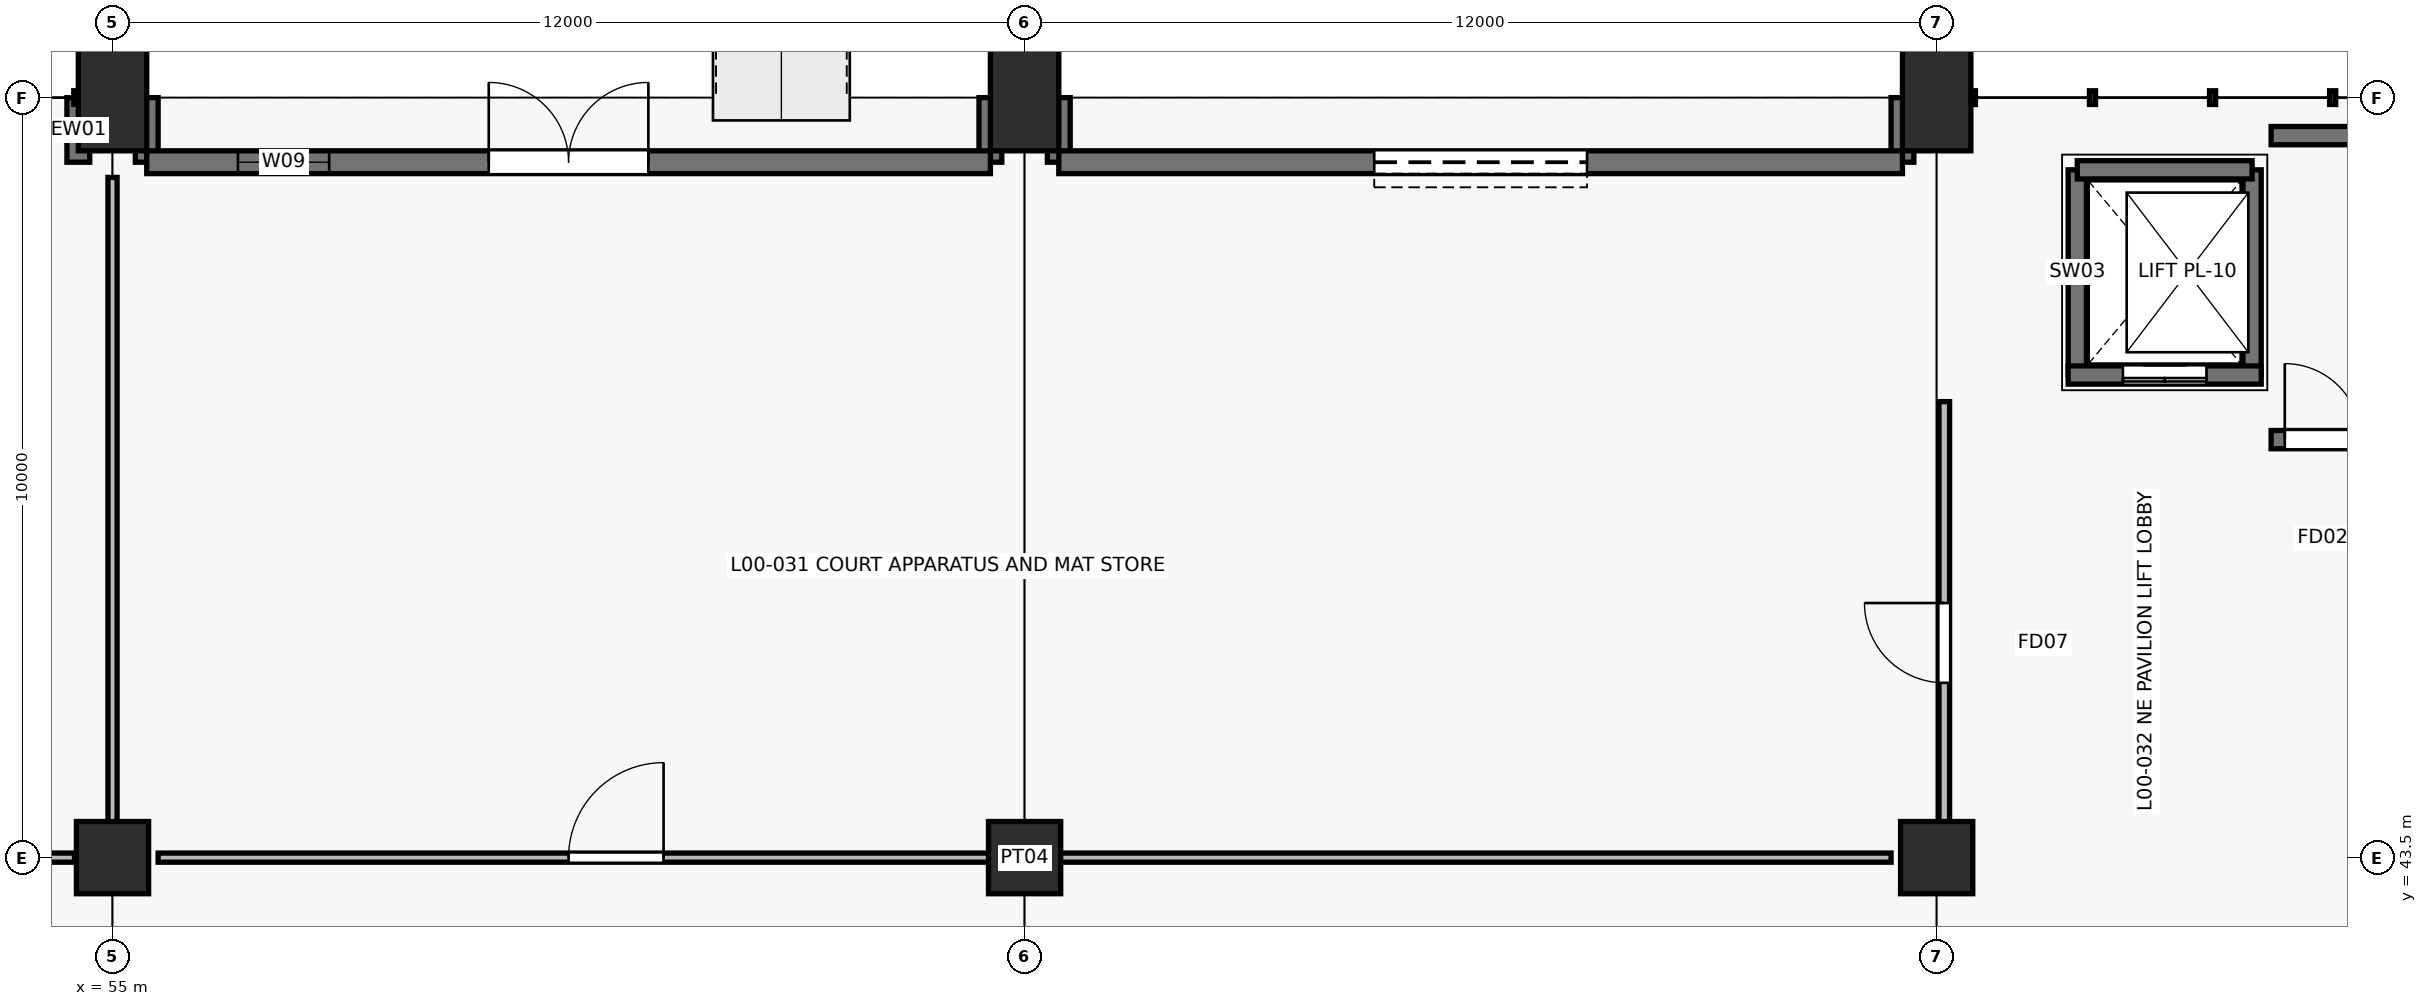
"""IFC4 building model, lengths in metres.
Left out: names, types, materials, properties, quantities, classifications, styles, units other than length and angle.
Written with IfcOpenShell. Run it as: python <this file> out.ifc"""

import sys

from ifc_helpers import new_model, si_unit, direction, frame, frame_2d, origin, origin_2d, place, context, subcontext, project, spatial, rectangle, extrude, element, fill, save


model = new_model("IFC4")
c1 = context("Model", 3, precision=1e-05, world=origin(), true_north=direction((0.0, 1.0)))
c2 = subcontext(c1, "Body", "Model", "MODEL_VIEW")
j1 = project(units=[si_unit("LENGTHUNIT", "METRE"), si_unit("PLANEANGLEUNIT", "RADIAN")], contexts=[c1])
p1 = place(None, origin())
s1 = spatial("IfcSite", under=j1, at=p1, CompositionType="ELEMENT")
p2 = place(p1, origin())
s2 = spatial("IfcBuilding", under=s1, at=p2, CompositionType="ELEMENT")
p3 = place(p2, origin())
s3 = spatial("IfcBuildingStorey", under=s2, at=p3, CompositionType="ELEMENT", Elevation=0.0)
p4 = place(p3, frame((55.0, 43.5, 0.0), z_axis=(0.0, 0.0, 1.0), x_axis=(1.0, 0.0, 0.0)))
e1 = element("IfcColumn", 1, at=p4, inside=s3, PredefinedType="COLUMN", context=c2, shape_type="SweptSolid", body=[
    extrude(rectangle(XDim=0.95, YDim=0.95, at=origin_2d()), origin(), (0.0, 0.0, 1.0), 4.8),
])
p5 = place(p3, frame((55.0, 53.5, 0.0), z_axis=(0.0, 0.0, 1.0), x_axis=(1.0, 0.0, 0.0)))
e2 = element("IfcColumn", 2, at=p5, inside=s3, PredefinedType="PILASTER", context=c2, shape_type="SweptSolid", body=[
    extrude(rectangle(XDim=0.9, YDim=1.4, at=origin_2d()), origin(), (0.0, 0.0, 1.0), 4.8),
])
p6 = place(p3, frame((67.0, 43.5, 0.0), z_axis=(0.0, 0.0, 1.0), x_axis=(1.0, 0.0, 0.0)))
e3 = element("IfcColumn", 3, at=p6, inside=s3, PredefinedType="COLUMN", context=c2, shape_type="SweptSolid", body=[
    extrude(rectangle(XDim=0.95, YDim=0.95, at=origin_2d()), origin(), (0.0, 0.0, 1.0), 4.8),
])
p7 = place(p3, frame((67.0, 53.5, 0.0), z_axis=(0.0, 0.0, 1.0), x_axis=(1.0, 0.0, 0.0)))
e4 = element("IfcColumn", 4, at=p7, inside=s3, PredefinedType="PILASTER", context=c2, shape_type="SweptSolid", body=[
    extrude(rectangle(XDim=0.9, YDim=1.4, at=origin_2d()), origin(), (0.0, 0.0, 1.0), 4.8),
])
p8 = place(p3, frame((79.0, 43.5, 0.0), z_axis=(0.0, 0.0, 1.0), x_axis=(1.0, 0.0, 0.0)))
e5 = element("IfcColumn", 5, at=p8, inside=s3, PredefinedType="COLUMN", context=c2, shape_type="SweptSolid", body=[
    extrude(rectangle(XDim=0.95, YDim=0.95, at=origin_2d()), origin(), (0.0, 0.0, 1.0), 4.8),
])
p9 = place(p3, frame((79.0, 53.5, 0.0), z_axis=(0.0, 0.0, 1.0), x_axis=(1.0, 0.0, 0.0)))
e6 = element("IfcColumn", 6, at=p9, inside=s3, PredefinedType="PILASTER", context=c2, shape_type="SweptSolid", body=[
    extrude(rectangle(XDim=0.9, YDim=1.4, at=origin_2d()), origin(), (0.0, 0.0, 1.0), 4.8),
])
for number, where, z_axis, x_axis in (
    (7, (54.55, 53.5, 0.0), (0.0, 0.0, 1.0), (0.0, -1.0, 0.0)),
    (8, (55.45, 52.65, 0.0), (0.0, 0.0, 1.0), (0.0, 1.0, 0.0)),
    (9, (66.55, 53.5, 0.0), (0.0, 0.0, 1.0), (0.0, -1.0, 0.0)),
):
    element("IfcWall", number, at=place(p3, frame(where, z_axis=z_axis, x_axis=x_axis)), inside=s3, PredefinedType="SOLIDWALL", context=c2, shape_type="SweptSolid", body=[
        extrude(rectangle(XDim=0.85, YDim=0.3, at=frame_2d((0.425, 0.0))), origin(), (0.0, 0.0, 1.0), 4.8),
    ])
p10 = place(p3, frame((55.45, 52.65, 0.0), z_axis=(0.0, 0.0, 1.0), x_axis=(1.0, 0.0, 0.0)))
e10 = element("IfcWall", 10, at=p10, inside=s3, PredefinedType="SOLIDWALL", context=c2, shape_type="SweptSolid", body=[
    extrude(rectangle(XDim=11.1, YDim=0.3, at=frame_2d((5.55, 0.0))), origin(), (0.0, 0.0, 1.0), 4.8),
])
p11 = place(p10, frame((4.5, 0.0, 0.0)))
e11 = element("IfcOpeningElement", 11, at=p11, cuts=e10, PredefinedType="OPENING", context=c2, shape_type="SweptSolid", body=[
    extrude(rectangle(XDim=2.1, YDim=2.35, at=frame_2d((1.05, 1.175))), frame((0.0, 0.16, 0.0), z_axis=(0.0, -1.0, 0.0), x_axis=(1.0, 0.0, 0.0)), (0.0, 0.0, 1.0), 0.32),
])
p12 = place(p10, frame((1.2, 0.0, 1.0)))
e12 = element("IfcOpeningElement", 12, at=p12, cuts=e10, PredefinedType="OPENING", context=c2, shape_type="SweptSolid", body=[
    extrude(rectangle(XDim=1.2, YDim=1.8, at=frame_2d((0.6, 0.9))), frame((0.0, 0.16, 0.0), z_axis=(0.0, -1.0, 0.0), x_axis=(1.0, 0.0, 0.0)), (0.0, 0.0, 1.0), 0.32),
])
for number, where, z_axis, x_axis in (
    (13, (67.45, 52.65, 0.0), (0.0, 0.0, 1.0), (0.0, 1.0, 0.0)),
    (14, (78.55, 53.5, 0.0), (0.0, 0.0, 1.0), (0.0, -1.0, 0.0)),
):
    element("IfcWall", number, at=place(p3, frame(where, z_axis=z_axis, x_axis=x_axis)), inside=s3, PredefinedType="SOLIDWALL", context=c2, shape_type="SweptSolid", body=[
        extrude(rectangle(XDim=0.85, YDim=0.3, at=frame_2d((0.425, 0.0))), origin(), (0.0, 0.0, 1.0), 4.8),
    ])
p13 = place(p3, frame((67.45, 52.65, 0.0), z_axis=(0.0, 0.0, 1.0), x_axis=(1.0, 0.0, 0.0)))
e15 = element("IfcWall", 15, at=p13, inside=s3, PredefinedType="SOLIDWALL", context=c2, shape_type="SweptSolid", body=[
    extrude(rectangle(XDim=11.1, YDim=0.3, at=frame_2d((5.55, 0.0))), origin(), (0.0, 0.0, 1.0), 4.8),
])
p14 = place(p13, frame((4.15, 0.0, 0.0)))
e16 = element("IfcOpeningElement", 16, at=p14, cuts=e15, PredefinedType="OPENING", context=c2, shape_type="SweptSolid", body=[
    extrude(rectangle(XDim=2.8, YDim=2.7, at=frame_2d((1.4, 1.35))), frame((0.0, 0.16, 0.0), z_axis=(0.0, -1.0, 0.0), x_axis=(1.0, 0.0, 0.0)), (0.0, 0.0, 1.0), 0.32),
])
p15 = place(p3, frame((80.85, 49.85, -1.3), z_axis=(0.0, 0.0, 1.0), x_axis=(0.0, 1.0, 0.0)))
e17 = element("IfcWall", 17, at=p15, inside=s3, PredefinedType="SHEAR", context=c2, shape_type="SweptSolid", body=[
    extrude(rectangle(XDim=2.7, YDim=0.24, at=frame_2d((1.35, 0.0))), origin(), (0.0, 0.0, 1.0), 6.1),
])
p16 = place(p3, frame((83.15, 52.55, 0.0), z_axis=(0.0, 0.0, 1.0), x_axis=(0.0, -1.0, 0.0)))
e18 = element("IfcWall", 18, at=p16, inside=s3, PredefinedType="SHEAR", context=c2, shape_type="SweptSolid", body=[
    extrude(rectangle(XDim=2.7, YDim=0.24, at=frame_2d((1.35, 0.0))), origin(), (0.0, 0.0, 1.0), 4.8),
])
p17 = place(p3, frame((80.85, 52.55, 0.0), z_axis=(0.0, 0.0, 1.0), x_axis=(1.0, 0.0, 0.0)))
e19 = element("IfcWall", 19, at=p17, inside=s3, PredefinedType="SHEAR", context=c2, shape_type="SweptSolid", body=[
    extrude(rectangle(XDim=2.3, YDim=0.24, at=frame_2d((1.15, 0.0))), origin(), (0.0, 0.0, 1.0), 4.8),
])
p18 = place(p3, frame((83.27, 49.85, 0.0), z_axis=(0.0, 0.0, 1.0), x_axis=(-1.0, 0.0, 0.0)))
e20 = element("IfcWall", 20, at=p18, inside=s3, PredefinedType="SHEAR", context=c2, shape_type="SweptSolid", body=[
    extrude(rectangle(XDim=2.54, YDim=0.24, at=frame_2d((1.27, 0.0))), origin(), (0.0, 0.0, 1.0), 4.8),
])
p19 = place(p18, frame((0.72, 0.0, 0.0)))
e21 = element("IfcOpeningElement", 21, at=p19, cuts=e20, PredefinedType="OPENING", context=c2, shape_type="SweptSolid", body=[
    extrude(rectangle(XDim=1.1, YDim=2.15, at=frame_2d((0.55, 1.075))), frame((0.0, 0.13, 0.0), z_axis=(0.0, -1.0, 0.0), x_axis=(1.0, 0.0, 0.0)), (0.0, 0.0, 1.0), 0.26),
])
p20 = place(p3, frame((83.4, 53.0, 0.0), z_axis=(0.0, 0.0, 1.0), x_axis=(1.0, 0.0, 0.0)))
e22 = element("IfcWall", 22, at=p20, inside=s3, PredefinedType="SHEAR", context=c2, shape_type="SweptSolid", body=[
    extrude(rectangle(XDim=7.15, YDim=0.24, at=frame_2d((3.575, 0.0))), origin(), (0.0, 0.0, 1.0), 4.8),
])
p21 = place(p3, frame((83.4, 49.0, 0.0), z_axis=(0.0, 0.0, 1.0), x_axis=(1.0, 0.0, 0.0)))
e23 = element("IfcWall", 23, at=p21, inside=s3, PredefinedType="SHEAR", context=c2, shape_type="SweptSolid", body=[
    extrude(rectangle(XDim=7.15, YDim=0.24, at=frame_2d((3.575, 0.0))), origin(), (0.0, 0.0, 1.0), 4.8),
])
p22 = place(p21, frame((0.18, 0.0, 0.0)))
e24 = element("IfcOpeningElement", 24, at=p22, cuts=e23, PredefinedType="OPENING", context=c2, shape_type="SweptSolid", body=[
    extrude(rectangle(XDim=1.0, YDim=2.15, at=frame_2d((0.5, 1.075))), frame((0.0, 0.13, 0.0), z_axis=(0.0, -1.0, 0.0), x_axis=(1.0, 0.0, 0.0)), (0.0, 0.0, 1.0), 0.26),
])
p23 = place(p3, frame((79.1, 43.6, 0.0), z_axis=(0.0, 0.0, 1.0), x_axis=(0.0, 1.0, 0.0)))
e25 = element("IfcWall", 25, at=p23, inside=s3, PredefinedType="PARTITIONING", context=c2, shape_type="SweptSolid", body=[
    extrude(rectangle(XDim=5.9, YDim=0.14, at=frame_2d((2.95, 0.0))), origin(), (0.0, 0.0, 1.0), 3.645),
])
p24 = place(p23, frame((2.2, 0.0, 0.0)))
e26 = element("IfcOpeningElement", 26, at=p24, cuts=e25, PredefinedType="OPENING", context=c2, shape_type="SweptSolid", body=[
    extrude(rectangle(XDim=1.05, YDim=2.1, at=frame_2d((0.525, 1.05))), frame((0.0, 0.08, 0.0), z_axis=(0.0, -1.0, 0.0), x_axis=(1.0, 0.0, 0.0)), (0.0, 0.0, 1.0), 0.16),
])
p25 = place(p3, frame((19.5, 43.5, 0.0), z_axis=(0.0, 0.0, 1.0), x_axis=(1.0, 0.0, 0.0)))
e27 = element("IfcWall", 27, at=p25, inside=s3, PredefinedType="PARTITIONING", context=c2, shape_type="SweptSolid", body=[
    extrude(rectangle(XDim=35.0, YDim=0.12, at=frame_2d((17.5, 0.0))), origin(), (0.0, 0.0, 1.0), 3.645),
])
p26 = place(p25, frame((5.4, 0.0, 0.0)))
e28 = element("IfcOpeningElement", 28, at=p26, cuts=e27, PredefinedType="OPENING", context=c2, shape_type="SweptSolid", body=[
    extrude(rectangle(XDim=1.25, YDim=2.2, at=frame_2d((0.625, 1.1))), frame((0.0, 0.07, 0.0), z_axis=(0.0, -1.0, 0.0), x_axis=(1.0, 0.0, 0.0)), (0.0, 0.0, 1.0), 0.14),
])
p27 = place(p3, frame((55.6, 43.5, 0.0), z_axis=(0.0, 0.0, 1.0), x_axis=(1.0, 0.0, 0.0)))
e29 = element("IfcWall", 29, at=p27, inside=s3, PredefinedType="PARTITIONING", context=c2, shape_type="SweptSolid", body=[
    extrude(rectangle(XDim=22.8, YDim=0.12, at=frame_2d((11.4, 0.0))), origin(), (0.0, 0.0, 1.0), 3.645),
])
p28 = place(p27, frame((5.4, 0.0, 0.0)))
e30 = element("IfcOpeningElement", 30, at=p28, cuts=e29, PredefinedType="OPENING", context=c2, shape_type="SweptSolid", body=[
    extrude(rectangle(XDim=1.25, YDim=2.2, at=frame_2d((0.625, 1.1))), frame((0.0, 0.07, 0.0), z_axis=(0.0, -1.0, 0.0), x_axis=(1.0, 0.0, 0.0)), (0.0, 0.0, 1.0), 0.14),
])
p29 = place(p3, frame((55.0, 43.5, 0.0), z_axis=(0.0, 0.0, 1.0), x_axis=(0.0, 1.0, 0.0)))
e31 = element("IfcWall", 31, at=p29, inside=s3, PredefinedType="PARTITIONING", context=c2, shape_type="SweptSolid", body=[
    extrude(rectangle(XDim=8.95, YDim=0.12, at=frame_2d((4.475, 0.0))), origin(), (0.0, 0.0, 1.0), 3.645),
])
p30 = place(p11, origin())
e32 = element("IfcDoor", 32, at=p30, inside=s3, OperationType="DOUBLE_DOOR_SINGLE_SWING", PredefinedType="DOOR", context=c2, shape_type="SweptSolid", body=[
    extrude(rectangle(XDim=2.1, YDim=2.35, at=frame_2d((1.05, 1.175))), frame((0.0, 0.025, 0.0), z_axis=(0.0, -1.0, 0.0), x_axis=(1.0, 0.0, 0.0)), (0.0, 0.0, 1.0), 0.05),
])
fill(e11, e32)
p31 = place(p12, origin())
e33 = element("IfcWindow", 33, at=p31, inside=s3, PartitioningType="SINGLE_PANEL", PredefinedType="WINDOW", context=c2, shape_type="SweptSolid", body=[
    extrude(rectangle(XDim=1.2, YDim=1.8, at=frame_2d((0.6, 0.9))), frame((0.0, 0.03, 0.0), z_axis=(0.0, -1.0, 0.0), x_axis=(1.0, 0.0, 0.0)), (0.0, 0.0, 1.0), 0.06),
])
fill(e12, e33)
p32 = place(p14, origin())
e34 = element("IfcDoor", 34, at=p32, inside=s3, OperationType="DOUBLE_DOOR_SINGLE_SWING", PredefinedType="GATE", context=c2, shape_type="SweptSolid", body=[
    extrude(rectangle(XDim=2.8, YDim=2.7, at=frame_2d((1.4, 1.35))), frame((0.0, 0.025, 0.0), z_axis=(0.0, -1.0, 0.0), x_axis=(1.0, 0.0, 0.0)), (0.0, 0.0, 1.0), 0.05),
])
fill(e16, e34)
p33 = place(p19, origin())
e35 = element("IfcDoor", 35, at=p33, inside=s3, OperationType="DOUBLE_DOOR_SLIDING", PredefinedType="USERDEFINED", context=c2, shape_type="SweptSolid", body=[
    extrude(rectangle(XDim=1.1, YDim=2.15, at=frame_2d((0.55, 1.075))), frame((0.0, 0.025, 0.0), z_axis=(0.0, -1.0, 0.0), x_axis=(1.0, 0.0, 0.0)), (0.0, 0.0, 1.0), 0.05),
])
fill(e21, e35)
p34 = place(p22, origin())
e36 = element("IfcDoor", 36, at=p34, inside=s3, OperationType="SINGLE_SWING_LEFT", PredefinedType="DOOR", context=c2, shape_type="SweptSolid", body=[
    extrude(rectangle(XDim=1.0, YDim=2.15, at=frame_2d((0.5, 1.075))), frame((0.0, 0.025, 0.0), z_axis=(0.0, -1.0, 0.0), x_axis=(1.0, 0.0, 0.0)), (0.0, 0.0, 1.0), 0.05),
])
fill(e24, e36)
p35 = place(p24, origin())
e37 = element("IfcDoor", 37, at=p35, inside=s3, OperationType="SINGLE_SWING_RIGHT", PredefinedType="DOOR", context=c2, shape_type="SweptSolid", body=[
    extrude(rectangle(XDim=1.05, YDim=2.1, at=frame_2d((0.525, 1.05))), frame((0.0, 0.025, 0.0), z_axis=(0.0, -1.0, 0.0), x_axis=(1.0, 0.0, 0.0)), (0.0, 0.0, 1.0), 0.05),
])
fill(e26, e37)
p36 = place(p28, origin())
e38 = element("IfcDoor", 38, at=p36, inside=s3, OperationType="SINGLE_SWING_RIGHT", PredefinedType="DOOR", context=c2, shape_type="SweptSolid", body=[
    extrude(rectangle(XDim=1.25, YDim=2.2, at=frame_2d((0.625, 1.1))), frame((0.0, 0.025, 0.0), z_axis=(0.0, -1.0, 0.0), x_axis=(1.0, 0.0, 0.0)), (0.0, 0.0, 1.0), 0.05),
])
fill(e30, e38)
save(model, sys.argv[1])
